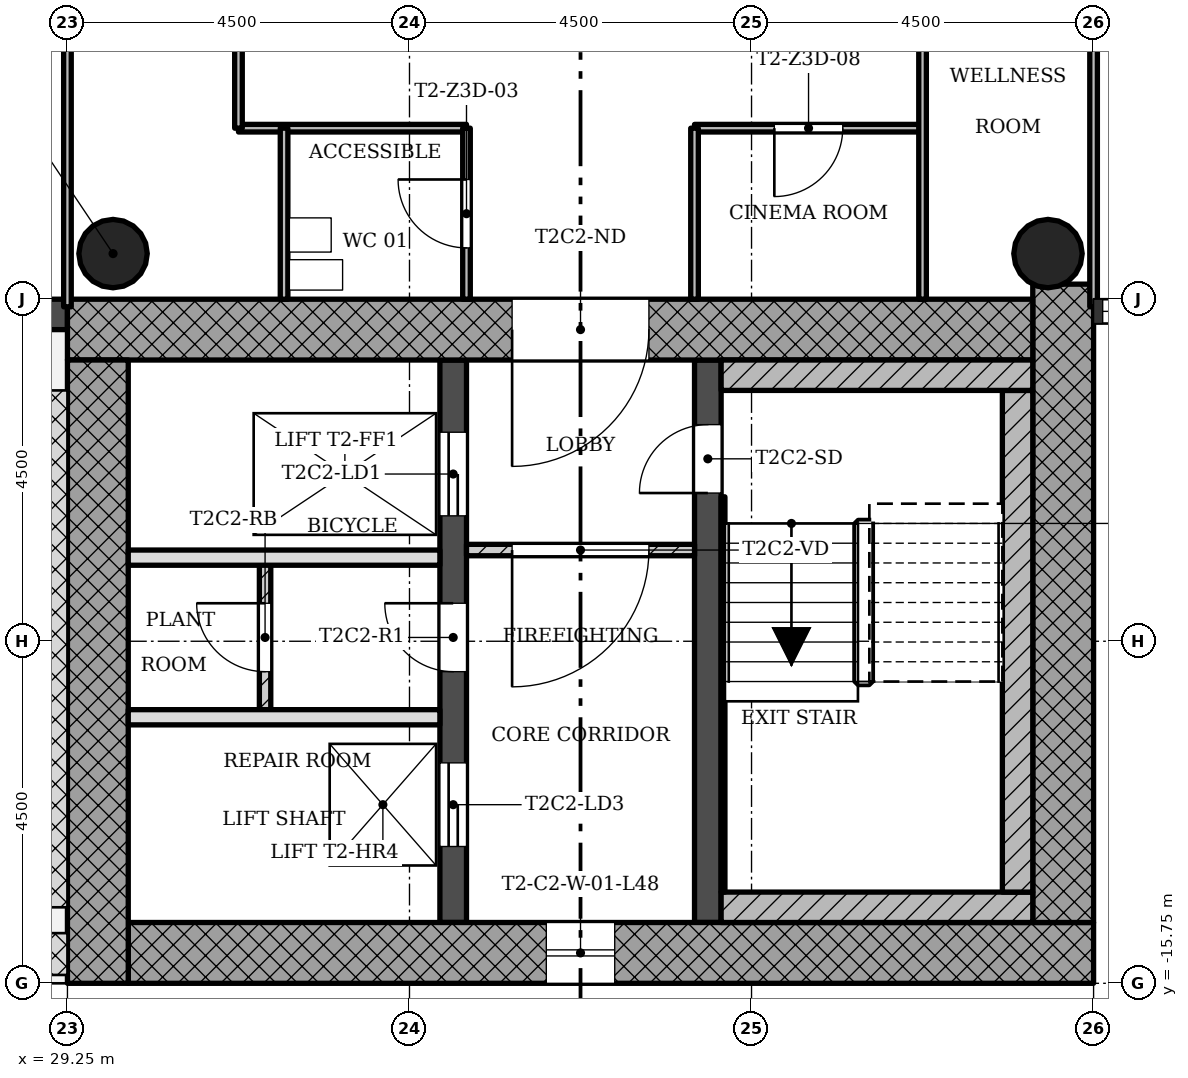
"""IFC4 building model, lengths in metres.
Left out: names, types, materials, properties, quantities, classifications, styles, units other than length and angle.
Written with IfcOpenShell. Run it as: python <this file> out.ifc"""

import sys

from ifc_helpers import new_model, si_unit, direction, frame, frame_2d, origin, origin_2d, place, context, subcontext, project, spatial, rectangle, hollow_circle, extrude, element, fill, save


model = new_model("IFC4")
c1 = context("Model", 3, precision=1e-05, world=origin(), true_north=direction((0.0, 1.0)))
c2 = subcontext(c1, "Body", "Model", "MODEL_VIEW")
j1 = project(units=[si_unit("LENGTHUNIT", "METRE"), si_unit("PLANEANGLEUNIT", "RADIAN")], contexts=[c1])
p1 = place(None, origin())
s1 = spatial("IfcSite", under=j1, at=p1, CompositionType="ELEMENT")
p2 = place(p1, origin())
s2 = spatial("IfcBuilding", under=s1, at=p2, CompositionType="ELEMENT")
p3 = place(p2, frame((0.0, 0.0, 174.5)))
s3 = spatial("IfcBuildingStorey", under=s2, at=p3, CompositionType="ELEMENT", Elevation=174.5)
p4 = place(p3, frame((30.05, -15.35, 0.0), z_axis=(0.0, 0.0, 1.0), x_axis=(1.0, 0.0, 0.0)))
e1 = element("IfcWall", 1, at=p4, inside=s3, PredefinedType="SHEAR", context=c2, shape_type="SweptSolid", body=[
    extrude(rectangle(XDim=12.7, YDim=0.8, at=frame_2d((6.35, 0.0))), origin(), (0.0, 0.0, 1.0), 3.4),
])
p5 = place(p4, frame((5.5, 0.0, 0.45)))
e2 = element("IfcOpeningElement", 2, at=p5, cuts=e1, PredefinedType="OPENING", context=c2, shape_type="SweptSolid", body=[
    extrude(rectangle(XDim=0.9, YDim=2.4, at=frame_2d((0.45, 1.2))), frame((0.0, 0.41, 0.0), z_axis=(0.0, -1.0, 0.0), x_axis=(1.0, 0.0, 0.0)), (0.0, 0.0, 1.0), 0.82),
])
p6 = place(p3, frame((42.35, -14.95, 0.0), z_axis=(0.0, 0.0, 1.0), x_axis=(0.0, 1.0, 0.0)))
e3 = element("IfcWall", 3, at=p6, inside=s3, PredefinedType="SHEAR", context=c2, shape_type="SweptSolid", body=[
    extrude(rectangle(XDim=8.398, YDim=0.8, at=frame_2d((4.199, 0.0))), origin(), (0.0, 0.0, 1.0), 3.4),
])
p7 = place(p3, frame((41.95, -7.15, 0.0), z_axis=(0.0, 0.0, 1.0), x_axis=(-1.0, 0.0, 0.0)))
e4 = element("IfcWall", 4, at=p7, inside=s3, PredefinedType="SHEAR", context=c2, shape_type="SweptSolid", body=[
    extrude(rectangle(XDim=12.7, YDim=0.8, at=frame_2d((6.35, 0.0))), origin(), (0.0, 0.0, 1.0), 3.4),
])
p8 = place(p7, frame((5.05, 0.0, 0.0)))
e5 = element("IfcOpeningElement", 5, at=p8, cuts=e4, PredefinedType="OPENING", context=c2, shape_type="SweptSolid", body=[
    extrude(rectangle(XDim=1.8, YDim=2.1, at=frame_2d((0.9, 1.05))), frame((0.0, 0.41, 0.0), z_axis=(0.0, -1.0, 0.0), x_axis=(1.0, 0.0, 0.0)), (0.0, 0.0, 1.0), 0.82),
])
p9 = place(p3, frame((29.65, -7.55, 0.0), z_axis=(0.0, 0.0, 1.0), x_axis=(0.0, -1.0, 0.0)))
e6 = element("IfcWall", 6, at=p9, inside=s3, PredefinedType="SHEAR", context=c2, shape_type="SweptSolid", body=[
    extrude(rectangle(XDim=8.2, YDim=0.8, at=frame_2d((4.1, 0.0))), origin(), (0.0, 0.0, 1.0), 3.4),
])
p10 = place(p3, frame((34.325, -14.95, 0.0), z_axis=(0.0, 0.0, 1.0), x_axis=(0.0, 1.0, 0.0)))
e7 = element("IfcWall", 7, at=p10, inside=s3, PredefinedType="SHEAR", context=c2, shape_type="SweptSolid", body=[
    extrude(rectangle(XDim=7.4, YDim=0.35, at=frame_2d((3.7, 0.0))), origin(), (0.0, 0.0, 1.0), 3.4),
])
p11 = place(p10, frame((5.35, 0.0, 0.0)))
e8 = element("IfcOpeningElement", 8, at=p11, cuts=e7, PredefinedType="OPENING", context=c2, shape_type="SweptSolid", body=[
    extrude(rectangle(XDim=1.1, YDim=2.1, at=frame_2d((0.55, 1.05))), frame((0.0, 0.185, 0.0), z_axis=(0.0, -1.0, 0.0), x_axis=(1.0, 0.0, 0.0)), (0.0, 0.0, 1.0), 0.37),
])
p12 = place(p10, frame((1.0, 0.0, 0.0)))
e9 = element("IfcOpeningElement", 9, at=p12, cuts=e7, PredefinedType="OPENING", context=c2, shape_type="SweptSolid", body=[
    extrude(rectangle(XDim=1.1, YDim=2.1, at=frame_2d((0.55, 1.05))), frame((0.0, 0.185, 0.0), z_axis=(0.0, -1.0, 0.0), x_axis=(1.0, 0.0, 0.0)), (0.0, 0.0, 1.0), 0.37),
])
p13 = place(p10, frame((3.3, 0.0, 0.0)))
e10 = element("IfcOpeningElement", 10, at=p13, cuts=e7, PredefinedType="OPENING", context=c2, shape_type="SweptSolid", body=[
    extrude(rectangle(XDim=0.9, YDim=2.1, at=frame_2d((0.45, 1.05))), frame((0.0, 0.185, 0.0), z_axis=(0.0, -1.0, 0.0), x_axis=(1.0, 0.0, 0.0)), (0.0, 0.0, 1.0), 0.37),
])
p14 = place(p3, frame((37.675, -14.95, 0.0), z_axis=(0.0, 0.0, 1.0), x_axis=(0.0, 1.0, 0.0)))
e11 = element("IfcWall", 11, at=p14, inside=s3, PredefinedType="SHEAR", context=c2, shape_type="SweptSolid", body=[
    extrude(rectangle(XDim=7.4, YDim=0.35, at=frame_2d((3.7, 0.0))), origin(), (0.0, 0.0, 1.0), 3.4),
])
p15 = place(p14, frame((5.65, 0.0, 0.0)))
e12 = element("IfcOpeningElement", 12, at=p15, cuts=e11, PredefinedType="OPENING", context=c2, shape_type="SweptSolid", body=[
    extrude(rectangle(XDim=0.9, YDim=2.1, at=frame_2d((0.45, 1.05))), frame((0.0, 0.185, 0.0), z_axis=(0.0, -1.0, 0.0), x_axis=(1.0, 0.0, 0.0)), (0.0, 0.0, 1.0), 0.37),
])
for number, where, z_axis, x_axis in (
    (13, (42.15, -6.15, 0.0), (0.0, 0.0, 1.0), (1.0, 0.0, 0.0)),
    (14, (29.85, -6.15, 0.0), (0.0, 0.0, 1.0), (1.0, 0.0, 0.0)),
):
    element("IfcColumn", number, at=place(p3, frame(where, z_axis=z_axis, x_axis=x_axis)), inside=s3, PredefinedType="COLUMN", context=c2, shape_type="SweptSolid", body=[
        extrude(hollow_circle(Radius=0.45, WallThickness=0.032, at=origin_2d()), origin(), (0.0, 0.0, 1.0), 3.4),
    ])
p16 = place(p3, frame((24.75, -6.95, -0.02), z_axis=(0.0, 0.0, 1.0), x_axis=(1.0, 0.0, 0.0)))
e15 = element("IfcWall", 15, at=p16, inside=s3, PredefinedType="STANDARD", context=c2, shape_type="SweptSolid", body=[
    extrude(rectangle(XDim=4.5, YDim=0.4, at=frame_2d((2.25, 0.0))), origin(), (0.0, 0.0, 1.0), 3.12),
])
p17 = place(p16, frame((1.35, 0.0, 0.02)))
e16 = element("IfcOpeningElement", 16, at=p17, cuts=e15, PredefinedType="OPENING", context=c2, shape_type="SweptSolid", body=[
    extrude(rectangle(XDim=1.8, YDim=2.1, at=frame_2d((0.9, 1.05))), frame((0.0, 0.21, 0.0), z_axis=(0.0, -1.0, 0.0), x_axis=(1.0, 0.0, 0.0)), (0.0, 0.0, 1.0), 0.42),
])
p18 = place(p3, frame((34.5, -10.05, 0.0), z_axis=(0.0, 0.0, 1.0), x_axis=(1.0, 0.0, 0.0)))
e17 = element("IfcWall", 17, at=p18, inside=s3, PredefinedType="PARTITIONING", context=c2, shape_type="SweptSolid", body=[
    extrude(rectangle(XDim=3.0, YDim=0.15, at=frame_2d((1.5, 0.0))), origin(), (0.0, 0.0, 1.0), 3.0),
])
p19 = place(p18, frame((0.6, 0.0, 0.0)))
e18 = element("IfcOpeningElement", 18, at=p19, cuts=e17, PredefinedType="OPENING", context=c2, shape_type="SweptSolid", body=[
    extrude(rectangle(XDim=1.8, YDim=2.1, at=frame_2d((0.9, 1.05))), frame((0.0, 0.085, 0.0), z_axis=(0.0, -1.0, 0.0), x_axis=(1.0, 0.0, 0.0)), (0.0, 0.0, 1.0), 0.17),
])
for number, where, z_axis, x_axis in (
    (19, (30.05, -12.25, 0.0), (0.0, 0.0, 1.0), (1.0, 0.0, 0.0)),
    (20, (30.05, -10.15, 0.0), (0.0, 0.0, 1.0), (1.0, 0.0, 0.0)),
):
    element("IfcWall", number, at=place(p3, frame(where, z_axis=z_axis, x_axis=x_axis)), inside=s3, PredefinedType="SOLIDWALL", context=c2, shape_type="SweptSolid", body=[
        extrude(rectangle(XDim=4.1, YDim=0.2, at=frame_2d((2.05, 0.0))), origin(), (0.0, 0.0, 1.0), 3.0),
    ])
p20 = place(p3, frame((31.85, -10.15, 0.0), z_axis=(0.0, 0.0, 1.0), x_axis=(0.0, -1.0, 0.0)))
e21 = element("IfcWall", 21, at=p20, inside=s3, PredefinedType="PARTITIONING", context=c2, shape_type="SweptSolid", body=[
    extrude(rectangle(XDim=2.1, YDim=0.15, at=frame_2d((1.05, 0.0))), origin(), (0.0, 0.0, 1.0), 3.0),
])
p21 = place(p20, frame((0.6, 0.0, 0.0)))
e22 = element("IfcOpeningElement", 22, at=p21, cuts=e21, PredefinedType="OPENING", context=c2, shape_type="SweptSolid", body=[
    extrude(rectangle(XDim=0.9, YDim=2.1, at=frame_2d((0.45, 1.05))), frame((0.0, 0.085, 0.0), z_axis=(0.0, -1.0, 0.0), x_axis=(1.0, 0.0, 0.0)), (0.0, 0.0, 1.0), 0.17),
])
p22 = place(p3, frame((40.5, -4.5, 0.0), z_axis=(0.0, 0.0, 1.0), x_axis=(-1.0, 0.0, 0.0)))
e23 = element("IfcWall", 23, at=p22, inside=s3, PredefinedType="PARTITIONING", context=c2, shape_type="SweptSolid", body=[
    extrude(rectangle(XDim=3.0, YDim=0.1, at=frame_2d((1.5, 0.0))), origin(), (0.0, 0.0, 1.0), 3.0),
])
p23 = place(p22, frame((1.05, 0.0, 0.0)))
e24 = element("IfcOpeningElement", 24, at=p23, cuts=e23, PredefinedType="OPENING", context=c2, shape_type="SweptSolid", body=[
    extrude(rectangle(XDim=0.9, YDim=2.1, at=frame_2d((0.45, 1.05))), frame((0.0, 0.06, 0.0), z_axis=(0.0, -1.0, 0.0), x_axis=(1.0, 0.0, 0.0)), (0.0, 0.0, 1.0), 0.12),
])
p24 = place(p3, frame((34.5, -4.5, 0.0), z_axis=(0.0, 0.0, 1.0), x_axis=(-1.0, 0.0, 0.0)))
e25 = element("IfcWall", 25, at=p24, inside=s3, PredefinedType="PARTITIONING", context=c2, shape_type="SweptSolid", body=[
    extrude(rectangle(XDim=3.0, YDim=0.1, at=frame_2d((1.5, 0.0))), origin(), (0.0, 0.0, 1.0), 3.0),
])
p25 = place(p3, frame((42.75, -6.85, 0.0), z_axis=(0.0, 0.0, 1.0), x_axis=(0.0, 1.0, 0.0)))
e26 = element("IfcWall", 26, at=p25, inside=s3, PredefinedType="PARTITIONING", context=c2, shape_type="SweptSolid", body=[
    extrude(rectangle(XDim=5.95, YDim=0.1, at=frame_2d((2.975, 0.0))), origin(), (0.0, 0.0, 1.0), 3.0),
])
p26 = place(p3, frame((40.5, -6.75, 0.0), z_axis=(0.0, 0.0, 1.0), x_axis=(0.0, 1.0, 0.0)))
e27 = element("IfcWall", 27, at=p26, inside=s3, PredefinedType="PARTITIONING", context=c2, shape_type="SweptSolid", body=[
    extrude(rectangle(XDim=5.85, YDim=0.1, at=frame_2d((2.925, 0.0))), origin(), (0.0, 0.0, 1.0), 3.0),
])
p27 = place(p26, frame((3.6, 0.0, 0.0)))
e28 = element("IfcOpeningElement", 28, at=p27, cuts=e27, PredefinedType="OPENING", context=c2, shape_type="SweptSolid", body=[
    extrude(rectangle(XDim=0.9, YDim=2.1, at=frame_2d((0.45, 1.05))), frame((0.0, 0.06, 0.0), z_axis=(0.0, -1.0, 0.0), x_axis=(1.0, 0.0, 0.0)), (0.0, 0.0, 1.0), 0.12),
])
p28 = place(p3, frame((37.5, -6.75, 0.0), z_axis=(0.0, 0.0, 1.0), x_axis=(0.0, 1.0, 0.0)))
e29 = element("IfcWall", 29, at=p28, inside=s3, PredefinedType="PARTITIONING", context=c2, shape_type="SweptSolid", body=[
    extrude(rectangle(XDim=2.25, YDim=0.1, at=frame_2d((1.125, 0.0))), origin(), (0.0, 0.0, 1.0), 3.0),
])
p29 = place(p3, frame((34.5, -6.75, 0.0), z_axis=(0.0, 0.0, 1.0), x_axis=(0.0, 1.0, 0.0)))
e30 = element("IfcWall", 30, at=p29, inside=s3, PredefinedType="PARTITIONING", context=c2, shape_type="SweptSolid", body=[
    extrude(rectangle(XDim=2.25, YDim=0.1, at=frame_2d((1.125, 0.0))), origin(), (0.0, 0.0, 1.0), 3.0),
])
p30 = place(p29, frame((0.675, 0.0, 0.0)))
e31 = element("IfcOpeningElement", 31, at=p30, cuts=e30, PredefinedType="OPENING", context=c2, shape_type="SweptSolid", body=[
    extrude(rectangle(XDim=0.9, YDim=2.1, at=frame_2d((0.45, 1.05))), frame((0.0, 0.06, 0.0), z_axis=(0.0, -1.0, 0.0), x_axis=(1.0, 0.0, 0.0)), (0.0, 0.0, 1.0), 0.12),
])
p31 = place(p3, frame((32.1, -6.75, 0.0), z_axis=(0.0, 0.0, 1.0), x_axis=(0.0, 1.0, 0.0)))
e32 = element("IfcWall", 32, at=p31, inside=s3, PredefinedType="PARTITIONING", context=c2, shape_type="SweptSolid", body=[
    extrude(rectangle(XDim=2.25, YDim=0.1, at=frame_2d((1.125, 0.0))), origin(), (0.0, 0.0, 1.0), 3.0),
])
p32 = place(p3, frame((31.5, -4.5, 0.0), z_axis=(0.0, 0.0, 1.0), x_axis=(0.0, 1.0, 0.0)))
e33 = element("IfcWall", 33, at=p32, inside=s3, PredefinedType="PARTITIONING", context=c2, shape_type="SweptSolid", body=[
    extrude(rectangle(XDim=3.6, YDim=0.1, at=frame_2d((1.8, 0.0))), origin(), (0.0, 0.0, 1.0), 3.0),
])
p33 = place(p32, frame((1.35, 0.0, 0.0)))
e34 = element("IfcOpeningElement", 34, at=p33, cuts=e33, PredefinedType="OPENING", context=c2, shape_type="SweptSolid", body=[
    extrude(rectangle(XDim=0.9, YDim=2.1, at=frame_2d((0.45, 1.05))), frame((0.0, 0.06, 0.0), z_axis=(0.0, -1.0, 0.0), x_axis=(1.0, 0.0, 0.0)), (0.0, 0.0, 1.0), 0.12),
])
p34 = place(p3, frame((29.25, -6.85, 0.0), z_axis=(0.0, 0.0, 1.0), x_axis=(0.0, 1.0, 0.0)))
e35 = element("IfcWall", 35, at=p34, inside=s3, PredefinedType="PARTITIONING", context=c2, shape_type="SweptSolid", body=[
    extrude(rectangle(XDim=5.95, YDim=0.1, at=frame_2d((2.975, 0.0))), origin(), (0.0, 0.0, 1.0), 3.0),
])
p35 = place(p3, frame((37.85, -14.75, 0.0), z_axis=(0.0, 0.0, 1.0), x_axis=(1.0, 0.0, 0.0)))
e36 = element("IfcWall", 36, at=p35, inside=s3, PredefinedType="SHEAR", context=c2, shape_type="SweptSolid", body=[
    extrude(rectangle(XDim=4.1, YDim=0.4, at=frame_2d((2.05, 0.0))), origin(), (0.0, 0.0, 1.0), 3.4),
])
p36 = place(p3, frame((41.75, -7.95, 0.0), z_axis=(0.0, 0.0, 1.0), x_axis=(0.0, -1.0, 0.0)))
e37 = element("IfcWall", 37, at=p36, inside=s3, PredefinedType="SHEAR", context=c2, shape_type="SweptSolid", body=[
    extrude(rectangle(XDim=6.6, YDim=0.4, at=frame_2d((3.3, 0.0))), origin(), (0.0, 0.0, 1.0), 3.4),
])
p37 = place(p3, frame((37.85, -7.75, 0.0), z_axis=(0.0, 0.0, 1.0), x_axis=(1.0, 0.0, 0.0)))
e38 = element("IfcWall", 38, at=p37, inside=s3, PredefinedType="SHEAR", context=c2, shape_type="SweptSolid", body=[
    extrude(rectangle(XDim=4.1, YDim=0.4, at=frame_2d((2.05, 0.0))), origin(), (0.0, 0.0, 1.0), 3.4),
])
p38 = place(p3, frame((37.875, -9.35, 0.0), z_axis=(0.0, 0.0, 1.0), x_axis=(0.0, -1.0, 0.0)))
e39 = element("IfcWall", 39, at=p38, inside=s3, PredefinedType="SHEAR", context=c2, shape_type="SweptSolid", body=[
    extrude(rectangle(XDim=5.2, YDim=0.05, at=frame_2d((2.6, 0.0))), origin(), (0.0, 0.0, 1.0), 3.4),
])
p39 = place(p5, origin())
e40 = element("IfcWindow", 40, at=p39, inside=s3, PartitioningType="SINGLE_PANEL", PredefinedType="WINDOW", context=c2, shape_type="SweptSolid", body=[
    extrude(rectangle(XDim=0.9, YDim=2.4, at=frame_2d((0.45, 1.2))), frame((0.0, 0.03, 0.0), z_axis=(0.0, -1.0, 0.0), x_axis=(1.0, 0.0, 0.0)), (0.0, 0.0, 1.0), 0.06),
])
fill(e2, e40)
p40 = place(p19, origin())
e41 = element("IfcDoor", 41, at=p40, inside=s3, OperationType="SINGLE_SWING_LEFT", PredefinedType="DOOR", context=c2, shape_type="SweptSolid", body=[
    extrude(rectangle(XDim=1.8, YDim=2.1, at=frame_2d((0.9, 1.05))), frame((0.0, 0.025, 0.0), z_axis=(0.0, -1.0, 0.0), x_axis=(1.0, 0.0, 0.0)), (0.0, 0.0, 1.0), 0.05),
])
fill(e18, e41)
p41 = place(p21, origin())
e42 = element("IfcDoor", 42, at=p41, inside=s3, OperationType="SINGLE_SWING_LEFT", PredefinedType="DOOR", context=c2, shape_type="SweptSolid", body=[
    extrude(rectangle(XDim=0.9, YDim=2.1, at=frame_2d((0.45, 1.05))), frame((0.0, 0.025, 0.0), z_axis=(0.0, -1.0, 0.0), x_axis=(1.0, 0.0, 0.0)), (0.0, 0.0, 1.0), 0.05),
])
fill(e22, e42)
p42 = place(p30, origin())
e43 = element("IfcDoor", 43, at=p42, inside=s3, OperationType="SINGLE_SWING_LEFT", PredefinedType="DOOR", context=c2, shape_type="SweptSolid", body=[
    extrude(rectangle(XDim=0.9, YDim=2.1, at=frame_2d((0.45, 1.05))), frame((0.0, 0.025, 0.0), z_axis=(0.0, -1.0, 0.0), x_axis=(1.0, 0.0, 0.0)), (0.0, 0.0, 1.0), 0.05),
])
fill(e31, e43)
p43 = place(p23, origin())
e44 = element("IfcDoor", 44, at=p43, inside=s3, OperationType="SINGLE_SWING_LEFT", PredefinedType="DOOR", context=c2, shape_type="SweptSolid", body=[
    extrude(rectangle(XDim=0.9, YDim=2.1, at=frame_2d((0.45, 1.05))), frame((0.0, 0.025, 0.0), z_axis=(0.0, -1.0, 0.0), x_axis=(1.0, 0.0, 0.0)), (0.0, 0.0, 1.0), 0.05),
])
fill(e24, e44)
p44 = place(p15, origin())
e45 = element("IfcDoor", 45, at=p44, inside=s3, OperationType="SINGLE_SWING_RIGHT", PredefinedType="DOOR", context=c2, shape_type="SweptSolid", body=[
    extrude(rectangle(XDim=0.9, YDim=2.1, at=frame_2d((0.45, 1.05))), frame((0.0, 0.025, 0.0), z_axis=(0.0, -1.0, 0.0), x_axis=(1.0, 0.0, 0.0)), (0.0, 0.0, 1.0), 0.05),
])
fill(e12, e45)
p45 = place(p11, origin())
e46 = element("IfcDoor", 46, at=p45, inside=s3, OperationType="SLIDING_TO_LEFT", PredefinedType="DOOR", context=c2, shape_type="SweptSolid", body=[
    extrude(rectangle(XDim=1.1, YDim=2.1, at=frame_2d((0.55, 1.05))), frame((0.0, 0.025, 0.0), z_axis=(0.0, -1.0, 0.0), x_axis=(1.0, 0.0, 0.0)), (0.0, 0.0, 1.0), 0.05),
])
fill(e8, e46)
p46 = place(p12, origin())
e47 = element("IfcDoor", 47, at=p46, inside=s3, OperationType="SLIDING_TO_LEFT", PredefinedType="DOOR", context=c2, shape_type="SweptSolid", body=[
    extrude(rectangle(XDim=1.1, YDim=2.1, at=frame_2d((0.55, 1.05))), frame((0.0, 0.025, 0.0), z_axis=(0.0, -1.0, 0.0), x_axis=(1.0, 0.0, 0.0)), (0.0, 0.0, 1.0), 0.05),
])
fill(e9, e47)
p47 = place(p13, origin())
e48 = element("IfcDoor", 48, at=p47, inside=s3, OperationType="SINGLE_SWING_LEFT", PredefinedType="DOOR", context=c2, shape_type="SweptSolid", body=[
    extrude(rectangle(XDim=0.9, YDim=2.1, at=frame_2d((0.45, 1.05))), frame((0.0, 0.025, 0.0), z_axis=(0.0, -1.0, 0.0), x_axis=(1.0, 0.0, 0.0)), (0.0, 0.0, 1.0), 0.05),
])
fill(e10, e48)
p48 = place(p8, origin())
e49 = element("IfcDoor", 49, at=p48, inside=s3, OperationType="SINGLE_SWING_LEFT", PredefinedType="DOOR", context=c2, shape_type="SweptSolid", body=[
    extrude(rectangle(XDim=1.8, YDim=2.1, at=frame_2d((0.9, 1.05))), frame((0.0, 0.025, 0.0), z_axis=(0.0, -1.0, 0.0), x_axis=(1.0, 0.0, 0.0)), (0.0, 0.0, 1.0), 0.05),
])
fill(e5, e49)
save(model, sys.argv[1])
